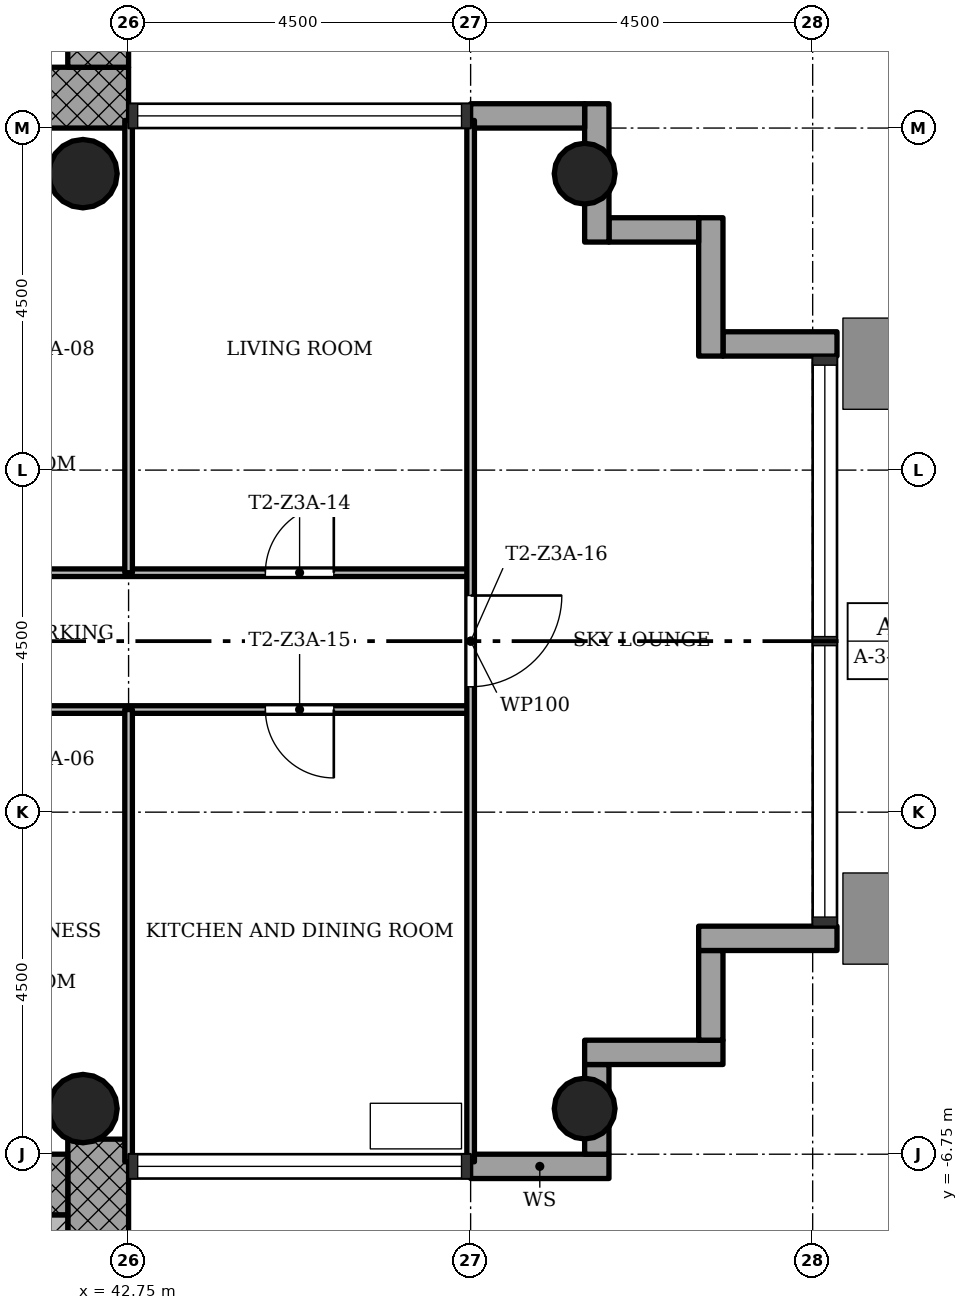
"""IFC4 building model, lengths in metres.
Left out: names, types, materials, properties, quantities, classifications, styles, units other than length and angle.
Written with IfcOpenShell. Run it as: python <this file> out.ifc"""

import sys

from ifc_helpers import new_model, si_unit, direction, frame, frame_2d, origin, origin_2d, place, context, subcontext, project, spatial, rectangle, hollow_circle, extrude, element, fill, save


model = new_model("IFC4")
c1 = context("Model", 3, precision=1e-05, world=origin(), true_north=direction((0.0, 1.0)))
c2 = subcontext(c1, "Body", "Model", "MODEL_VIEW")
j1 = project(units=[si_unit("LENGTHUNIT", "METRE"), si_unit("PLANEANGLEUNIT", "RADIAN")], contexts=[c1])
p1 = place(None, origin())
s1 = spatial("IfcSite", under=j1, at=p1, CompositionType="ELEMENT")
p2 = place(p1, origin())
s2 = spatial("IfcBuilding", under=s1, at=p2, CompositionType="ELEMENT")
p3 = place(p2, frame((0.0, 0.0, 137.1)))
s3 = spatial("IfcBuildingStorey", under=s2, at=p3, CompositionType="ELEMENT", Elevation=137.1)
p4 = place(p3, frame((30.05, 7.15, 0.0), z_axis=(0.0, 0.0, 1.0), x_axis=(1.0, 0.0, 0.0)))
e1 = element("IfcWall", 1, at=p4, inside=s3, PredefinedType="SHEAR", context=c2, shape_type="SweptSolid", body=[
    extrude(rectangle(XDim=12.7, YDim=0.8, at=frame_2d((6.35, 0.0))), origin(), (0.0, 0.0, 1.0), 3.4),
])
p5 = place(p4, frame((5.05, 0.0, 0.0)))
e2 = element("IfcOpeningElement", 2, at=p5, cuts=e1, PredefinedType="OPENING", context=c2, shape_type="SweptSolid", body=[
    extrude(rectangle(XDim=1.8, YDim=2.1, at=frame_2d((0.9, 1.05))), frame((0.0, 0.41, 0.0), z_axis=(0.0, -1.0, 0.0), x_axis=(1.0, 0.0, 0.0)), (0.0, 0.0, 1.0), 0.82),
])
p6 = place(p3, frame((42.35, 7.55, 0.0), z_axis=(0.0, 0.0, 1.0), x_axis=(0.0, 1.0, 0.0)))
e3 = element("IfcWall", 3, at=p6, inside=s3, PredefinedType="SHEAR", context=c2, shape_type="SweptSolid", body=[
    extrude(rectangle(XDim=8.2, YDim=0.8, at=frame_2d((4.1, 0.0))), origin(), (0.0, 0.0, 1.0), 3.4),
])
p7 = place(p3, frame((42.35, -14.95, 0.0), z_axis=(0.0, 0.0, 1.0), x_axis=(0.0, 1.0, 0.0)))
e4 = element("IfcWall", 4, at=p7, inside=s3, PredefinedType="SHEAR", context=c2, shape_type="SweptSolid", body=[
    extrude(rectangle(XDim=8.398, YDim=0.8, at=frame_2d((4.199, 0.0))), origin(), (0.0, 0.0, 1.0), 3.4),
])
p8 = place(p3, frame((41.95, -7.15, 0.0), z_axis=(0.0, 0.0, 1.0), x_axis=(-1.0, 0.0, 0.0)))
e5 = element("IfcWall", 5, at=p8, inside=s3, PredefinedType="SHEAR", context=c2, shape_type="SweptSolid", body=[
    extrude(rectangle(XDim=12.7, YDim=0.8, at=frame_2d((6.35, 0.0))), origin(), (0.0, 0.0, 1.0), 3.4),
])
p9 = place(p8, frame((5.05, 0.0, 0.0)))
e6 = element("IfcOpeningElement", 6, at=p9, cuts=e5, PredefinedType="OPENING", context=c2, shape_type="SweptSolid", body=[
    extrude(rectangle(XDim=1.8, YDim=2.1, at=frame_2d((0.9, 1.05))), frame((0.0, 0.41, 0.0), z_axis=(0.0, -1.0, 0.0), x_axis=(1.0, 0.0, 0.0)), (0.0, 0.0, 1.0), 0.82),
])
for number, where, z_axis, x_axis in (
    (7, (48.75, -6.15, 0.0), (0.0, 0.0, 1.0), (1.0, 0.0, 0.0)),
    (8, (48.75, 6.15, 0.0), (0.0, 0.0, 1.0), (1.0, 0.0, 0.0)),
):
    element("IfcColumn", number, at=place(p3, frame(where, z_axis=z_axis, x_axis=x_axis)), inside=s3, PredefinedType="COLUMN", context=c2, shape_type="SweptSolid", body=[
        extrude(hollow_circle(Radius=0.4, WallThickness=0.028, at=origin_2d()), origin(), (0.0, 0.0, 1.0), 3.4),
    ])
for number, where, z_axis, x_axis in (
    (9, (42.15, -6.15, 0.0), (0.0, 0.0, 1.0), (1.0, 0.0, 0.0)),
    (10, (42.15, 6.15, 0.0), (0.0, 0.0, 1.0), (1.0, 0.0, 0.0)),
):
    element("IfcColumn", number, at=place(p3, frame(where, z_axis=z_axis, x_axis=x_axis)), inside=s3, PredefinedType="COLUMN", context=c2, shape_type="SweptSolid", body=[
        extrude(hollow_circle(Radius=0.45, WallThickness=0.032, at=origin_2d()), origin(), (0.0, 0.0, 1.0), 3.4),
    ])
p10 = place(p3, frame((47.25, -6.91, -0.3), z_axis=(0.0, 0.0, 1.0), x_axis=(1.0, 0.0, 0.0)))
e11 = element("IfcWall", 11, at=p10, inside=s3, PredefinedType="STANDARD", context=c2, shape_type="SweptSolid", body=[
    extrude(rectangle(XDim=1.82, YDim=0.32, at=frame_2d((0.91, 0.0))), origin(), (0.0, 0.0, 1.0), 3.4),
])
p11 = place(p3, frame((48.91, -6.75, -0.3), z_axis=(0.0, 0.0, 1.0), x_axis=(0.0, 1.0, 0.0)))
e12 = element("IfcWall", 12, at=p11, inside=s3, PredefinedType="STANDARD", context=c2, shape_type="SweptSolid", body=[
    extrude(rectangle(XDim=1.18, YDim=0.32, at=frame_2d((0.59, 0.0))), origin(), (0.0, 0.0, 1.0), 3.4),
])
p12 = place(p3, frame((48.75, -5.41, -0.3), z_axis=(0.0, 0.0, 1.0), x_axis=(1.0, 0.0, 0.0)))
e13 = element("IfcWall", 13, at=p12, inside=s3, PredefinedType="STANDARD", context=c2, shape_type="SweptSolid", body=[
    extrude(rectangle(XDim=1.82, YDim=0.32, at=frame_2d((0.91, 0.0))), origin(), (0.0, 0.0, 1.0), 3.4),
])
p13 = place(p3, frame((50.41, -5.25, -0.3), z_axis=(0.0, 0.0, 1.0), x_axis=(0.0, 1.0, 0.0)))
e14 = element("IfcWall", 14, at=p13, inside=s3, PredefinedType="STANDARD", context=c2, shape_type="SweptSolid", body=[
    extrude(rectangle(XDim=1.18, YDim=0.32, at=frame_2d((0.59, 0.0))), origin(), (0.0, 0.0, 1.0), 3.4),
])
p14 = place(p3, frame((50.25, -3.91, -0.3), z_axis=(0.0, 0.0, 1.0), x_axis=(1.0, 0.0, 0.0)))
e15 = element("IfcWall", 15, at=p14, inside=s3, PredefinedType="STANDARD", context=c2, shape_type="SweptSolid", body=[
    extrude(rectangle(XDim=1.82, YDim=0.32, at=frame_2d((0.91, 0.0))), origin(), (0.0, 0.0, 1.0), 3.4),
])
p15 = place(p3, frame((52.07, 3.91, -0.3), z_axis=(0.0, 0.0, 1.0), x_axis=(-1.0, 0.0, 0.0)))
e16 = element("IfcWall", 16, at=p15, inside=s3, PredefinedType="STANDARD", context=c2, shape_type="SweptSolid", body=[
    extrude(rectangle(XDim=1.5, YDim=0.32, at=frame_2d((0.75, 0.0))), origin(), (0.0, 0.0, 1.0), 3.4),
])
p16 = place(p3, frame((50.41, 3.75, -0.3), z_axis=(0.0, 0.0, 1.0), x_axis=(0.0, 1.0, 0.0)))
e17 = element("IfcWall", 17, at=p16, inside=s3, PredefinedType="STANDARD", context=c2, shape_type="SweptSolid", body=[
    extrude(rectangle(XDim=1.82, YDim=0.32, at=frame_2d((0.91, 0.0))), origin(), (0.0, 0.0, 1.0), 3.4),
])
p17 = place(p3, frame((50.25, 5.41, -0.3), z_axis=(0.0, 0.0, 1.0), x_axis=(-1.0, 0.0, 0.0)))
e18 = element("IfcWall", 18, at=p17, inside=s3, PredefinedType="STANDARD", context=c2, shape_type="SweptSolid", body=[
    extrude(rectangle(XDim=1.18, YDim=0.32, at=frame_2d((0.59, 0.0))), origin(), (0.0, 0.0, 1.0), 3.4),
])
p18 = place(p3, frame((48.91, 5.25, -0.3), z_axis=(0.0, 0.0, 1.0), x_axis=(0.0, 1.0, 0.0)))
e19 = element("IfcWall", 19, at=p18, inside=s3, PredefinedType="STANDARD", context=c2, shape_type="SweptSolid", body=[
    extrude(rectangle(XDim=1.82, YDim=0.32, at=frame_2d((0.91, 0.0))), origin(), (0.0, 0.0, 1.0), 3.4),
])
p19 = place(p3, frame((48.75, 6.91, -0.3), z_axis=(0.0, 0.0, 1.0), x_axis=(-1.0, 0.0, 0.0)))
e20 = element("IfcWall", 20, at=p19, inside=s3, PredefinedType="STANDARD", context=c2, shape_type="SweptSolid", body=[
    extrude(rectangle(XDim=1.5, YDim=0.32, at=frame_2d((0.75, 0.0))), origin(), (0.0, 0.0, 1.0), 3.4),
])
p20 = place(p3, frame((47.25, -0.9, 0.0), z_axis=(0.0, 0.0, 1.0), x_axis=(-1.0, 0.0, 0.0)))
e21 = element("IfcWall", 21, at=p20, inside=s3, PredefinedType="PARTITIONING", context=c2, shape_type="SweptSolid", body=[
    extrude(rectangle(XDim=6.75, YDim=0.1, at=frame_2d((3.375, 0.0))), origin(), (0.0, 0.0, 1.0), 3.0),
])
p21 = place(p20, frame((1.8, 0.0, 0.0)))
e22 = element("IfcOpeningElement", 22, at=p21, cuts=e21, PredefinedType="OPENING", context=c2, shape_type="SweptSolid", body=[
    extrude(rectangle(XDim=0.9, YDim=2.1, at=frame_2d((0.45, 1.05))), frame((0.0, 0.06, 0.0), z_axis=(0.0, -1.0, 0.0), x_axis=(1.0, 0.0, 0.0)), (0.0, 0.0, 1.0), 0.12),
])
p22 = place(p3, frame((47.25, 0.9, 0.0), z_axis=(0.0, 0.0, 1.0), x_axis=(-1.0, 0.0, 0.0)))
e23 = element("IfcWall", 23, at=p22, inside=s3, PredefinedType="PARTITIONING", context=c2, shape_type="SweptSolid", body=[
    extrude(rectangle(XDim=6.75, YDim=0.1, at=frame_2d((3.375, 0.0))), origin(), (0.0, 0.0, 1.0), 3.0),
])
p23 = place(p22, frame((1.8, 0.0, 0.0)))
e24 = element("IfcOpeningElement", 24, at=p23, cuts=e23, PredefinedType="OPENING", context=c2, shape_type="SweptSolid", body=[
    extrude(rectangle(XDim=0.9, YDim=2.1, at=frame_2d((0.45, 1.05))), frame((0.0, 0.06, 0.0), z_axis=(0.0, -1.0, 0.0), x_axis=(1.0, 0.0, 0.0)), (0.0, 0.0, 1.0), 0.12),
])
p24 = place(p3, frame((47.25, -6.85, 0.0), z_axis=(0.0, 0.0, 1.0), x_axis=(0.0, 1.0, 0.0)))
e25 = element("IfcWall", 25, at=p24, inside=s3, PredefinedType="PARTITIONING", context=c2, shape_type="SweptSolid", body=[
    extrude(rectangle(XDim=13.7, YDim=0.1, at=frame_2d((6.85, 0.0))), origin(), (0.0, 0.0, 1.0), 3.0),
])
p25 = place(p24, frame((6.25, 0.0, 0.0)))
e26 = element("IfcOpeningElement", 26, at=p25, cuts=e25, PredefinedType="OPENING", context=c2, shape_type="SweptSolid", body=[
    extrude(rectangle(XDim=1.2, YDim=2.1, at=frame_2d((0.6, 1.05))), frame((0.0, 0.06, 0.0), z_axis=(0.0, -1.0, 0.0), x_axis=(1.0, 0.0, 0.0)), (0.0, 0.0, 1.0), 0.12),
])
for number, where, z_axis, x_axis in (
    (27, (42.75, -6.85, 0.0), (0.0, 0.0, 1.0), (0.0, 1.0, 0.0)),
    (28, (42.75, 0.9, 0.0), (0.0, 0.0, 1.0), (0.0, 1.0, 0.0)),
):
    element("IfcWall", number, at=place(p3, frame(where, z_axis=z_axis, x_axis=x_axis)), inside=s3, PredefinedType="PARTITIONING", context=c2, shape_type="SweptSolid", body=[
        extrude(rectangle(XDim=5.95, YDim=0.1, at=frame_2d((2.975, 0.0))), origin(), (0.0, 0.0, 1.0), 3.0),
    ])
p26 = place(p3, frame((37.85, -7.75, 0.0), z_axis=(0.0, 0.0, 1.0), x_axis=(1.0, 0.0, 0.0)))
e29 = element("IfcWall", 29, at=p26, inside=s3, PredefinedType="SHEAR", context=c2, shape_type="SweptSolid", body=[
    extrude(rectangle(XDim=4.1, YDim=0.4, at=frame_2d((2.05, 0.0))), origin(), (0.0, 0.0, 1.0), 3.4),
])
p27 = place(p23, origin())
e30 = element("IfcDoor", 30, at=p27, inside=s3, OperationType="SINGLE_SWING_LEFT", PredefinedType="DOOR", context=c2, shape_type="SweptSolid", body=[
    extrude(rectangle(XDim=0.9, YDim=2.1, at=frame_2d((0.45, 1.05))), frame((0.0, 0.025, 0.0), z_axis=(0.0, -1.0, 0.0), x_axis=(1.0, 0.0, 0.0)), (0.0, 0.0, 1.0), 0.05),
])
fill(e24, e30)
p28 = place(p21, origin())
e31 = element("IfcDoor", 31, at=p28, inside=s3, OperationType="SINGLE_SWING_RIGHT", PredefinedType="DOOR", context=c2, shape_type="SweptSolid", body=[
    extrude(rectangle(XDim=0.9, YDim=2.1, at=frame_2d((0.45, 1.05))), frame((0.0, 0.025, 0.0), z_axis=(0.0, -1.0, 0.0), x_axis=(1.0, 0.0, 0.0)), (0.0, 0.0, 1.0), 0.05),
])
fill(e22, e31)
p29 = place(p25, origin())
e32 = element("IfcDoor", 32, at=p29, inside=s3, OperationType="SINGLE_SWING_RIGHT", PredefinedType="DOOR", context=c2, shape_type="SweptSolid", body=[
    extrude(rectangle(XDim=1.2, YDim=2.1, at=frame_2d((0.6, 1.05))), frame((0.0, 0.025, 0.0), z_axis=(0.0, -1.0, 0.0), x_axis=(1.0, 0.0, 0.0)), (0.0, 0.0, 1.0), 0.05),
])
fill(e26, e32)
save(model, sys.argv[1])
